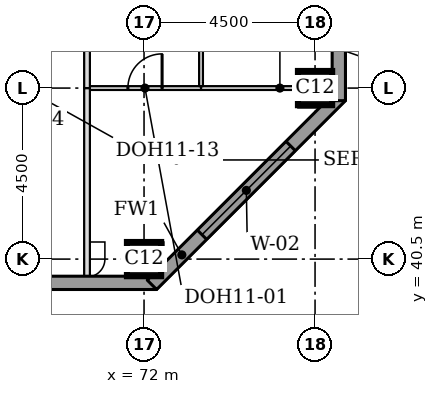
"""IFC4 building model, lengths in metres.
Left out: names, types, materials, properties, quantities, classifications, styles, units other than length and angle.
Written with IfcOpenShell. Run it as: python <this file> out.ifc"""

import sys

from ifc_helpers import new_model, si_unit, direction, frame, frame_2d, origin, origin_2d, place, context, subcontext, project, spatial, rectangle, extrude, element, fill, save


model = new_model("IFC4")
c1 = context("Model", 3, precision=1e-05, world=origin(), true_north=direction((0.0, 1.0)))
c2 = subcontext(c1, "Body", "Model", "MODEL_VIEW")
j1 = project(units=[si_unit("LENGTHUNIT", "METRE"), si_unit("PLANEANGLEUNIT", "RADIAN")], contexts=[c1])
p1 = place(None, origin())
s1 = spatial("IfcSite", under=j1, at=p1, CompositionType="ELEMENT")
p2 = place(p1, origin())
s2 = spatial("IfcBuilding", under=s1, at=p2, CompositionType="ELEMENT")
p3 = place(p2, frame((0.0, 0.0, 237.8)))
s3 = spatial("IfcBuildingStorey", under=s2, at=p3, CompositionType="ELEMENT", Elevation=237.8)
for number, where, z_axis, x_axis in (
    (1, (72.0, 40.5, 0.0), (0.0, 0.0, 1.0), (1.0, 0.0, 0.0)),
    (2, (76.5, 45.0, 0.0), (0.0, 0.0, 1.0), (1.0, 0.0, 0.0)),
):
    element("IfcColumn", number, at=place(p3, frame(where, z_axis=z_axis, x_axis=x_axis)), inside=s3, PredefinedType="COLUMN", context=c2, shape_type="SweptSolid", body=[
        extrude(rectangle(XDim=0.9, YDim=0.9, at=origin_2d()), origin(), (0.0, 0.0, 1.0), 3.7),
    ])
p4 = place(p3, frame((36.0, 39.875, 0.0), z_axis=(0.0, 0.0, 1.0), x_axis=(1.0, 0.0, 0.0)))
e3 = element("IfcWall", 3, at=p4, inside=s3, PredefinedType="STANDARD", context=c2, shape_type="SweptSolid", body=[
    extrude(rectangle(XDim=36.331, YDim=0.35, at=frame_2d((18.166, 0.0))), origin(), (0.0, 0.0, 1.0), 3.525),
])
p5 = place(p4, frame((5.1, 0.0, 0.9)))
e4 = element("IfcOpeningElement", 4, at=p5, cuts=e3, PredefinedType="OPENING", context=c2, shape_type="SweptSolid", body=[
    extrude(rectangle(XDim=3.3, YDim=1.9, at=frame_2d((1.65, 0.95))), frame((0.0, 0.185, 0.0), z_axis=(0.0, -1.0, 0.0), x_axis=(1.0, 0.0, 0.0)), (0.0, 0.0, 1.0), 0.37),
])
p6 = place(p4, frame((9.6, 0.0, 0.9)))
e5 = element("IfcOpeningElement", 5, at=p6, cuts=e3, PredefinedType="OPENING", context=c2, shape_type="SweptSolid", body=[
    extrude(rectangle(XDim=3.3, YDim=1.9, at=frame_2d((1.65, 0.95))), frame((0.0, 0.185, 0.0), z_axis=(0.0, -1.0, 0.0), x_axis=(1.0, 0.0, 0.0)), (0.0, 0.0, 1.0), 0.37),
])
p7 = place(p4, frame((14.1, 0.0, 0.9)))
e6 = element("IfcOpeningElement", 6, at=p7, cuts=e3, PredefinedType="OPENING", context=c2, shape_type="SweptSolid", body=[
    extrude(rectangle(XDim=3.3, YDim=1.9, at=frame_2d((1.65, 0.95))), frame((0.0, 0.185, 0.0), z_axis=(0.0, -1.0, 0.0), x_axis=(1.0, 0.0, 0.0)), (0.0, 0.0, 1.0), 0.37),
])
p8 = place(p4, frame((18.6, 0.0, 0.9)))
e7 = element("IfcOpeningElement", 7, at=p8, cuts=e3, PredefinedType="OPENING", context=c2, shape_type="SweptSolid", body=[
    extrude(rectangle(XDim=3.3, YDim=1.9, at=frame_2d((1.65, 0.95))), frame((0.0, 0.185, 0.0), z_axis=(0.0, -1.0, 0.0), x_axis=(1.0, 0.0, 0.0)), (0.0, 0.0, 1.0), 0.37),
])
p9 = place(p4, frame((23.1, 0.0, 0.9)))
e8 = element("IfcOpeningElement", 8, at=p9, cuts=e3, PredefinedType="OPENING", context=c2, shape_type="SweptSolid", body=[
    extrude(rectangle(XDim=3.3, YDim=1.9, at=frame_2d((1.65, 0.95))), frame((0.0, 0.185, 0.0), z_axis=(0.0, -1.0, 0.0), x_axis=(1.0, 0.0, 0.0)), (0.0, 0.0, 1.0), 0.37),
])
p10 = place(p4, frame((27.6, 0.0, 0.9)))
e9 = element("IfcOpeningElement", 9, at=p10, cuts=e3, PredefinedType="OPENING", context=c2, shape_type="SweptSolid", body=[
    extrude(rectangle(XDim=3.3, YDim=1.9, at=frame_2d((1.65, 0.95))), frame((0.0, 0.185, 0.0), z_axis=(0.0, -1.0, 0.0), x_axis=(1.0, 0.0, 0.0)), (0.0, 0.0, 1.0), 0.37),
])
p11 = place(p3, frame((72.208, 39.824, 0.0), z_axis=(0.0, 0.0, 1.0), x_axis=(0.707106781187, 0.707106781187, 0.0)))
e10 = element("IfcWall", 10, at=p11, inside=s3, PredefinedType="STANDARD", context=c2, shape_type="SweptSolid", body=[
    extrude(rectangle(XDim=7.027, YDim=0.35, at=frame_2d((3.513, 0.0))), origin(), (0.0, 0.0, 1.0), 3.525),
])
p12 = place(p11, frame((1.863, 0.0, 0.9)))
e11 = element("IfcOpeningElement", 11, at=p12, cuts=e10, PredefinedType="OPENING", context=c2, shape_type="SweptSolid", body=[
    extrude(rectangle(XDim=3.3, YDim=1.9, at=frame_2d((1.65, 0.95))), frame((0.0, 0.185, 0.0), z_axis=(0.0, -1.0, 0.0), x_axis=(1.0, 0.0, 0.0)), (0.0, 0.0, 1.0), 0.37),
])
p13 = place(p3, frame((77.125, 44.669, 0.0), z_axis=(0.0, 0.0, 1.0), x_axis=(0.0, 1.0, 0.0)))
e12 = element("IfcWall", 12, at=p13, inside=s3, PredefinedType="STANDARD", context=c2, shape_type="SweptSolid", body=[
    extrude(rectangle(XDim=32.163, YDim=0.35, at=frame_2d((16.081, 0.0))), origin(), (0.0, 0.0, 1.0), 3.525),
])
p14 = place(p13, frame((5.431, 0.0, 0.9)))
e13 = element("IfcOpeningElement", 13, at=p14, cuts=e12, PredefinedType="OPENING", context=c2, shape_type="SweptSolid", body=[
    extrude(rectangle(XDim=3.3, YDim=1.9, at=frame_2d((1.65, 0.95))), frame((0.0, 0.185, 0.0), z_axis=(0.0, -1.0, 0.0), x_axis=(1.0, 0.0, 0.0)), (0.0, 0.0, 1.0), 0.37),
])
p15 = place(p13, frame((9.931, 0.0, 0.9)))
e14 = element("IfcOpeningElement", 14, at=p15, cuts=e12, PredefinedType="OPENING", context=c2, shape_type="SweptSolid", body=[
    extrude(rectangle(XDim=3.3, YDim=1.9, at=frame_2d((1.65, 0.95))), frame((0.0, 0.185, 0.0), z_axis=(0.0, -1.0, 0.0), x_axis=(1.0, 0.0, 0.0)), (0.0, 0.0, 1.0), 0.37),
])
p16 = place(p13, frame((14.431, 0.0, 0.9)))
e15 = element("IfcOpeningElement", 15, at=p16, cuts=e12, PredefinedType="OPENING", context=c2, shape_type="SweptSolid", body=[
    extrude(rectangle(XDim=3.3, YDim=1.9, at=frame_2d((1.65, 0.95))), frame((0.0, 0.185, 0.0), z_axis=(0.0, -1.0, 0.0), x_axis=(1.0, 0.0, 0.0)), (0.0, 0.0, 1.0), 0.37),
])
p17 = place(p13, frame((18.931, 0.0, 0.9)))
e16 = element("IfcOpeningElement", 16, at=p17, cuts=e12, PredefinedType="OPENING", context=c2, shape_type="SweptSolid", body=[
    extrude(rectangle(XDim=3.3, YDim=1.9, at=frame_2d((1.65, 0.95))), frame((0.0, 0.185, 0.0), z_axis=(0.0, -1.0, 0.0), x_axis=(1.0, 0.0, 0.0)), (0.0, 0.0, 1.0), 0.37),
])
p18 = place(p13, frame((23.431, 0.0, 0.9)))
e17 = element("IfcOpeningElement", 17, at=p18, cuts=e12, PredefinedType="OPENING", context=c2, shape_type="SweptSolid", body=[
    extrude(rectangle(XDim=3.3, YDim=1.9, at=frame_2d((1.65, 0.95))), frame((0.0, 0.185, 0.0), z_axis=(0.0, -1.0, 0.0), x_axis=(1.0, 0.0, 0.0)), (0.0, 0.0, 1.0), 0.37),
])
p19 = place(p3, frame((70.575, 45.0, 0.0), z_axis=(0.0, 0.0, 1.0), x_axis=(1.0, 0.0, 0.0)))
e18 = element("IfcWall", 18, at=p19, inside=s3, PredefinedType="PARTITIONING", context=c2, shape_type="SweptSolid", body=[
    extrude(rectangle(XDim=2.925, YDim=0.1, at=frame_2d((1.462, 0.0))), origin(), (0.0, 0.0, 1.0), 3.096),
])
p20 = place(p19, frame((1.0, 0.0, 0.0)))
e19 = element("IfcOpeningElement", 19, at=p20, cuts=e18, PredefinedType="OPENING", context=c2, shape_type="SweptSolid", body=[
    extrude(rectangle(XDim=0.9, YDim=2.1, at=frame_2d((0.45, 1.05))), frame((0.0, 0.06, 0.0), z_axis=(0.0, -1.0, 0.0), x_axis=(1.0, 0.0, 0.0)), (0.0, 0.0, 1.0), 0.12),
])
p21 = place(p3, frame((73.5, 45.0, 0.0), z_axis=(0.0, 0.0, 1.0), x_axis=(1.0, 0.0, 0.0)))
e20 = element("IfcWall", 20, at=p21, inside=s3, PredefinedType="PARTITIONING", context=c2, shape_type="SweptSolid", body=[
    extrude(rectangle(XDim=2.55, YDim=0.1, at=frame_2d((1.275, 0.0))), origin(), (0.0, 0.0, 1.0), 3.096),
])
p22 = place(p3, frame((70.5, 40.05, 0.0), z_axis=(0.0, 0.0, 1.0), x_axis=(0.0, 1.0, 0.0)))
e21 = element("IfcWall", 21, at=p22, inside=s3, PredefinedType="PARTITIONING", context=c2, shape_type="SweptSolid", body=[
    extrude(rectangle(XDim=4.95, YDim=0.15, at=frame_2d((2.475, 0.0))), origin(), (0.0, 0.0, 1.0), 3.55),
])
p23 = place(p3, frame((70.5, 45.0, 0.0), z_axis=(0.0, 0.0, 1.0), x_axis=(0.0, 1.0, 0.0)))
e22 = element("IfcWall", 22, at=p23, inside=s3, PredefinedType="PARTITIONING", context=c2, shape_type="SweptSolid", body=[
    extrude(rectangle(XDim=18.0, YDim=0.15, at=frame_2d((9.0, 0.0))), origin(), (0.0, 0.0, 1.0), 3.55),
])
p24 = place(p23, frame((8.5, 0.0, 0.0)))
e23 = element("IfcOpeningElement", 23, at=p24, cuts=e22, PredefinedType="OPENING", context=c2, shape_type="SweptSolid", body=[
    extrude(rectangle(XDim=1.0, YDim=2.1, at=frame_2d((0.5, 1.05))), frame((0.0, 0.085, 0.0), z_axis=(0.0, -1.0, 0.0), x_axis=(1.0, 0.0, 0.0)), (0.0, 0.0, 1.0), 0.17),
])
p25 = place(p3, frame((73.5, 45.05, 0.0), z_axis=(0.0, 0.0, 1.0), x_axis=(0.0, 1.0, 0.0)))
e24 = element("IfcWall", 24, at=p25, inside=s3, PredefinedType="PARTITIONING", context=c2, shape_type="SweptSolid", body=[
    extrude(rectangle(XDim=4.45, YDim=0.1, at=frame_2d((2.225, 0.0))), origin(), (0.0, 0.0, 1.0), 3.55),
])
p26 = place(p25, frame((1.8, 0.0, 0.0)))
e25 = element("IfcOpeningElement", 25, at=p26, cuts=e24, PredefinedType="OPENING", context=c2, shape_type="SweptSolid", body=[
    extrude(rectangle(XDim=0.9, YDim=2.1, at=frame_2d((0.45, 1.05))), frame((0.0, 0.06, 0.0), z_axis=(0.0, -1.0, 0.0), x_axis=(1.0, 0.0, 0.0)), (0.0, 0.0, 1.0), 0.12),
])
p27 = place(p12, origin())
e26 = element("IfcWindow", 26, at=p27, inside=s3, PartitioningType="SINGLE_PANEL", PredefinedType="WINDOW", context=c2, shape_type="SweptSolid", body=[
    extrude(rectangle(XDim=3.3, YDim=1.9, at=frame_2d((1.65, 0.95))), frame((0.0, 0.085, 0.0), z_axis=(0.0, -1.0, 0.0), x_axis=(1.0, 0.0, 0.0)), (0.0, 0.0, 1.0), 0.06),
])
fill(e11, e26)
p28 = place(p20, origin())
e27 = element("IfcDoor", 27, at=p28, inside=s3, OperationType="SINGLE_SWING_RIGHT", PredefinedType="DOOR", context=c2, shape_type="SweptSolid", body=[
    extrude(rectangle(XDim=0.9, YDim=2.1, at=frame_2d((0.45, 1.05))), frame((0.0, 0.025, 0.0), z_axis=(0.0, -1.0, 0.0), x_axis=(1.0, 0.0, 0.0)), (0.0, 0.0, 1.0), 0.05),
])
fill(e19, e27)
save(model, sys.argv[1])
